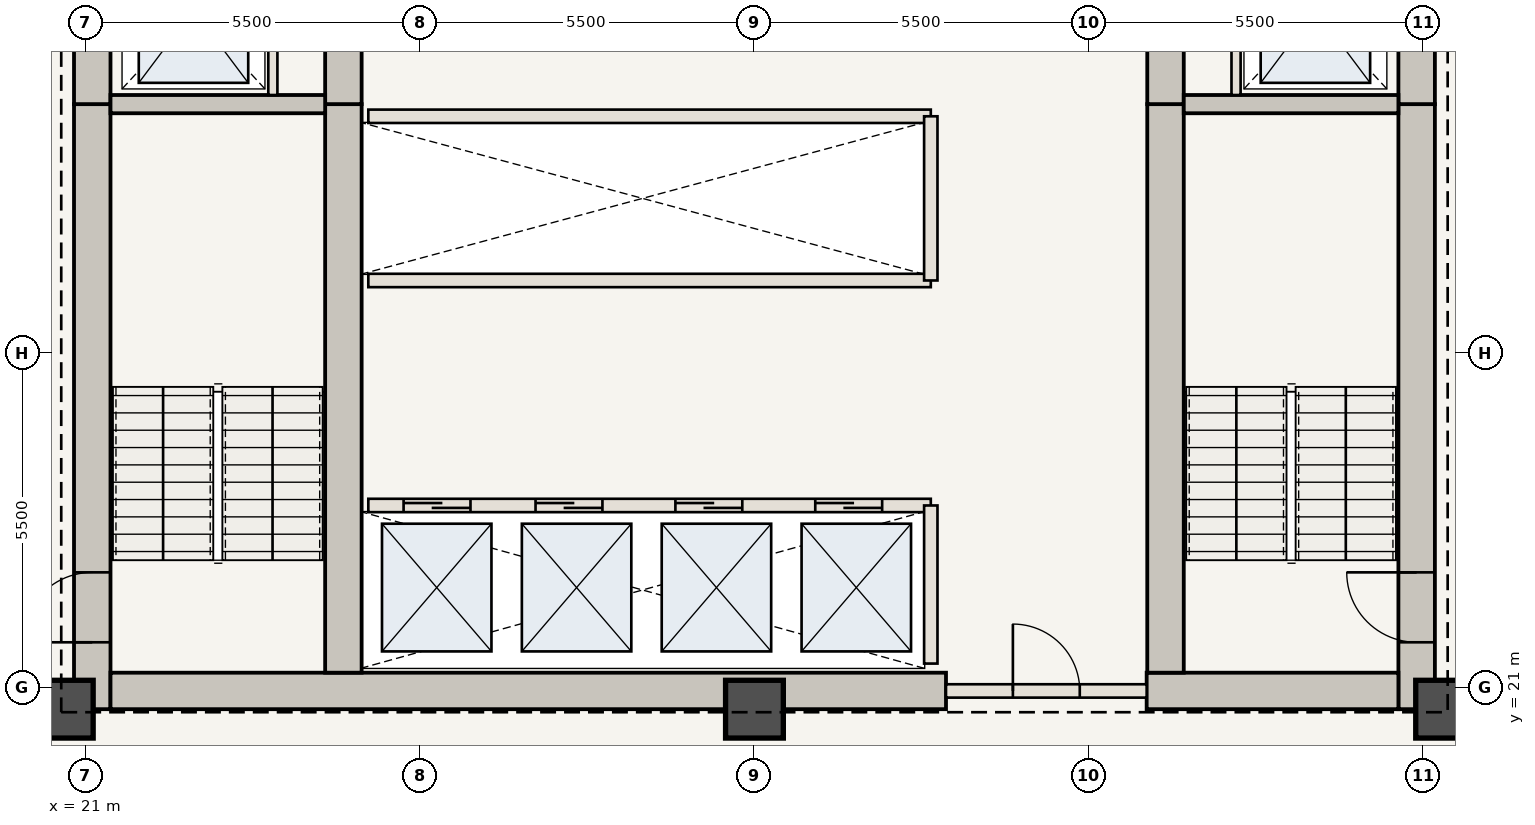
"""IFC4 building model, lengths in metres.
Left out: names, types, materials, properties, quantities, classifications, styles, units other than length and angle.
Written with IfcOpenShell. Run it as: python <this file> out.ifc"""

import sys

from ifc_helpers import new_model, si_unit, direction, frame, frame_2d, origin, origin_2d, place, context, subcontext, project, spatial, rectangle, extrude, element, fill, save


model = new_model("IFC4")
c1 = context("Model", 3, precision=1e-05, world=origin(), true_north=direction((0.0, 1.0)))
c2 = subcontext(c1, "Body", "Model", "MODEL_VIEW")
j1 = project(units=[si_unit("LENGTHUNIT", "METRE"), si_unit("PLANEANGLEUNIT", "RADIAN")], contexts=[c1])
p1 = place(None, origin())
s1 = spatial("IfcSite", under=j1, at=p1, CompositionType="ELEMENT")
p2 = place(p1, origin())
s2 = spatial("IfcBuilding", under=s1, at=p2, CompositionType="ELEMENT")
p3 = place(p2, frame((0.0, 0.0, 152.95)))
s3 = spatial("IfcBuildingStorey", under=s2, at=p3, CompositionType="ELEMENT", Elevation=152.95)
p4 = place(p3, frame((21.11, 20.65, 0.0), z_axis=(0.0, 0.0, 1.0), x_axis=(0.0, 1.0, 0.0)))
e1 = element("IfcWall", 1, at=p4, inside=s3, PredefinedType="SHEAR", context=c2, shape_type="SweptSolid", body=[
    extrude(rectangle(XDim=9.95, YDim=0.6, at=frame_2d((4.975, 0.0))), origin(), (0.0, 0.0, 1.0), 3.85),
])
p5 = place(p4, frame((1.1, 0.0, 0.0)))
e2 = element("IfcOpeningElement", 2, at=p5, cuts=e1, PredefinedType="OPENING", context=c2, shape_type="SweptSolid", body=[
    extrude(rectangle(XDim=1.15, YDim=2.15, at=frame_2d((0.575, 1.075))), frame((0.0, 0.31, 0.0), z_axis=(0.0, -1.0, 0.0), x_axis=(1.0, 0.0, 0.0)), (0.0, 0.0, 1.0), 0.62),
])
p6 = place(p3, frame((21.11, 30.6, 0.0), z_axis=(0.0, 0.0, 1.0), x_axis=(0.0, 1.0, 0.0)))
e3 = element("IfcWall", 3, at=p6, inside=s3, PredefinedType="SHEAR", context=c2, shape_type="SweptSolid", body=[
    extrude(rectangle(XDim=12.7, YDim=0.6, at=frame_2d((6.35, 0.0))), origin(), (0.0, 0.0, 1.0), 3.85),
])
p7 = place(p6, frame((4.2, 0.0, 0.0)))
e4 = element("IfcOpeningElement", 4, at=p7, cuts=e3, PredefinedType="OPENING", context=c2, shape_type="SweptSolid", body=[
    extrude(rectangle(XDim=1.1, YDim=2.15, at=frame_2d((0.55, 1.075))), frame((0.0, 0.31, 0.0), z_axis=(0.0, -1.0, 0.0), x_axis=(1.0, 0.0, 0.0)), (0.0, 0.0, 1.0), 0.62),
])
p8 = place(p6, frame((9.2, 0.0, 0.0)))
e5 = element("IfcOpeningElement", 5, at=p8, cuts=e3, PredefinedType="OPENING", context=c2, shape_type="SweptSolid", body=[
    extrude(rectangle(XDim=0.92, YDim=2.1, at=frame_2d((0.46, 1.05))), frame((0.0, 0.31, 0.0), z_axis=(0.0, -1.0, 0.0), x_axis=(1.0, 0.0, 0.0)), (0.0, 0.0, 1.0), 0.62),
])
p9 = place(p3, frame((42.89, 20.65, 0.0), z_axis=(0.0, 0.0, 1.0), x_axis=(0.0, 1.0, 0.0)))
e6 = element("IfcWall", 6, at=p9, inside=s3, PredefinedType="SHEAR", context=c2, shape_type="SweptSolid", body=[
    extrude(rectangle(XDim=9.95, YDim=0.6, at=frame_2d((4.975, 0.0))), origin(), (0.0, 0.0, 1.0), 3.85),
])
p10 = place(p9, frame((1.1, 0.0, 0.0)))
e7 = element("IfcOpeningElement", 7, at=p10, cuts=e6, PredefinedType="OPENING", context=c2, shape_type="SweptSolid", body=[
    extrude(rectangle(XDim=1.15, YDim=2.15, at=frame_2d((0.575, 1.075))), frame((0.0, 0.31, 0.0), z_axis=(0.0, -1.0, 0.0), x_axis=(1.0, 0.0, 0.0)), (0.0, 0.0, 1.0), 0.62),
])
p11 = place(p3, frame((42.89, 30.6, 0.0), z_axis=(0.0, 0.0, 1.0), x_axis=(0.0, 1.0, 0.0)))
e8 = element("IfcWall", 8, at=p11, inside=s3, PredefinedType="SHEAR", context=c2, shape_type="SweptSolid", body=[
    extrude(rectangle(XDim=12.7, YDim=0.6, at=frame_2d((6.35, 0.0))), origin(), (0.0, 0.0, 1.0), 3.85),
])
p12 = place(p11, frame((4.2, 0.0, 0.0)))
e9 = element("IfcOpeningElement", 9, at=p12, cuts=e8, PredefinedType="OPENING", context=c2, shape_type="SweptSolid", body=[
    extrude(rectangle(XDim=1.1, YDim=2.15, at=frame_2d((0.55, 1.075))), frame((0.0, 0.31, 0.0), z_axis=(0.0, -1.0, 0.0), x_axis=(1.0, 0.0, 0.0)), (0.0, 0.0, 1.0), 0.62),
])
p13 = place(p11, frame((8.05, 0.0, 0.0)))
e10 = element("IfcOpeningElement", 10, at=p13, cuts=e8, PredefinedType="OPENING", context=c2, shape_type="SweptSolid", body=[
    extrude(rectangle(XDim=0.88, YDim=2.1, at=frame_2d((0.44, 1.05))), frame((0.0, 0.31, 0.0), z_axis=(0.0, -1.0, 0.0), x_axis=(1.0, 0.0, 0.0)), (0.0, 0.0, 1.0), 0.62),
])
p14 = place(p11, frame((9.45, 0.0, 0.0)))
e11 = element("IfcOpeningElement", 11, at=p14, cuts=e8, PredefinedType="OPENING", context=c2, shape_type="SweptSolid", body=[
    extrude(rectangle(XDim=0.88, YDim=2.1, at=frame_2d((0.44, 1.05))), frame((0.0, 0.31, 0.0), z_axis=(0.0, -1.0, 0.0), x_axis=(1.0, 0.0, 0.0)), (0.0, 0.0, 1.0), 0.62),
])
p15 = place(p11, frame((10.85, 0.0, 0.0)))
e12 = element("IfcOpeningElement", 12, at=p15, cuts=e8, PredefinedType="OPENING", context=c2, shape_type="SweptSolid", body=[
    extrude(rectangle(XDim=0.88, YDim=2.1, at=frame_2d((0.44, 1.05))), frame((0.0, 0.31, 0.0), z_axis=(0.0, -1.0, 0.0), x_axis=(1.0, 0.0, 0.0)), (0.0, 0.0, 1.0), 0.62),
])
p16 = place(p3, frame((21.41, 20.95, 0.0), z_axis=(0.0, 0.0, 1.0), x_axis=(1.0, 0.0, 0.0)))
e13 = element("IfcWall", 13, at=p16, inside=s3, PredefinedType="SHEAR", context=c2, shape_type="SweptSolid", body=[
    extrude(rectangle(XDim=13.74, YDim=0.6, at=frame_2d((6.87, 0.0))), origin(), (0.0, 0.0, 1.0), 3.85),
])
p17 = place(p3, frame((38.45, 20.95, 0.0), z_axis=(0.0, 0.0, 1.0), x_axis=(1.0, 0.0, 0.0)))
e14 = element("IfcWall", 14, at=p17, inside=s3, PredefinedType="SHEAR", context=c2, shape_type="SweptSolid", body=[
    extrude(rectangle(XDim=4.14, YDim=0.6, at=frame_2d((2.07, 0.0))), origin(), (0.0, 0.0, 1.0), 3.85),
])
p18 = place(p3, frame((25.24, 21.25, 0.0), z_axis=(0.0, 0.0, 1.0), x_axis=(0.0, 1.0, 0.0)))
e15 = element("IfcWall", 15, at=p18, inside=s3, PredefinedType="SHEAR", context=c2, shape_type="SweptSolid", body=[
    extrude(rectangle(XDim=9.35, YDim=0.6, at=frame_2d((4.675, 0.0))), origin(), (0.0, 0.0, 1.0), 3.85),
])
p19 = place(p3, frame((25.24, 30.6, 0.0), z_axis=(0.0, 0.0, 1.0), x_axis=(0.0, 1.0, 0.0)))
e16 = element("IfcWall", 16, at=p19, inside=s3, PredefinedType="SHEAR", context=c2, shape_type="SweptSolid", body=[
    extrude(rectangle(XDim=12.1, YDim=0.6, at=frame_2d((6.05, 0.0))), origin(), (0.0, 0.0, 1.0), 3.85),
])
p20 = place(p19, frame((6.25, 0.0, 0.0)))
e17 = element("IfcOpeningElement", 17, at=p20, cuts=e16, PredefinedType="OPENING", context=c2, shape_type="SweptSolid", body=[
    extrude(rectangle(XDim=1.1, YDim=2.15, at=frame_2d((0.55, 1.075))), frame((0.0, 0.31, 0.0), z_axis=(0.0, -1.0, 0.0), x_axis=(1.0, 0.0, 0.0)), (0.0, 0.0, 1.0), 0.62),
])
p21 = place(p3, frame((38.76, 21.25, 0.0), z_axis=(0.0, 0.0, 1.0), x_axis=(0.0, 1.0, 0.0)))
e18 = element("IfcWall", 18, at=p21, inside=s3, PredefinedType="SHEAR", context=c2, shape_type="SweptSolid", body=[
    extrude(rectangle(XDim=9.35, YDim=0.6, at=frame_2d((4.675, 0.0))), origin(), (0.0, 0.0, 1.0), 3.85),
])
p22 = place(p3, frame((38.76, 30.6, 0.0), z_axis=(0.0, 0.0, 1.0), x_axis=(0.0, 1.0, 0.0)))
e19 = element("IfcWall", 19, at=p22, inside=s3, PredefinedType="SHEAR", context=c2, shape_type="SweptSolid", body=[
    extrude(rectangle(XDim=12.1, YDim=0.6, at=frame_2d((6.05, 0.0))), origin(), (0.0, 0.0, 1.0), 3.85),
])
for number, where, z_axis, x_axis in (
    (20, (20.65, 20.65, 0.0), (0.0, 0.0, 1.0), (1.0, 0.0, 0.0)),
    (21, (32.0, 20.65, 0.0), (0.0, 0.0, 1.0), (1.0, 0.0, 0.0)),
    (22, (43.35, 20.65, 0.0), (0.0, 0.0, 1.0), (1.0, 0.0, 0.0)),
):
    element("IfcColumn", number, at=place(p3, frame(where, z_axis=z_axis, x_axis=x_axis)), inside=s3, PredefinedType="COLUMN", context=c2, shape_type="SweptSolid", body=[
        extrude(rectangle(XDim=0.95, YDim=0.95, at=origin_2d()), origin(), (0.0, 0.0, 1.0), 3.85),
    ])
for number, where, z_axis, x_axis in (
    (23, (21.41, 30.6, 0.0), (0.0, 0.0, 1.0), (1.0, 0.0, 0.0)),
    (24, (39.06, 30.6, 0.0), (0.0, 0.0, 1.0), (1.0, 0.0, 0.0)),
):
    element("IfcWall", number, at=place(p3, frame(where, z_axis=z_axis, x_axis=x_axis)), inside=s3, PredefinedType="SHEAR", context=c2, shape_type="SweptSolid", body=[
        extrude(rectangle(XDim=3.53, YDim=0.3, at=frame_2d((1.765, 0.0))), origin(), (0.0, 0.0, 1.0), 3.685),
    ])
for number, where, z_axis, x_axis in (
    (25, (24.08, 30.75, 0.0), (0.0, 0.0, 1.0), (0.0, 1.0, 0.0)),
    (26, (39.92, 30.75, 0.0), (0.0, 0.0, 1.0), (0.0, 1.0, 0.0)),
):
    element("IfcWall", number, at=place(p3, frame(where, z_axis=z_axis, x_axis=x_axis)), inside=s3, PredefinedType="STANDARD", context=c2, shape_type="SweptSolid", body=[
        extrude(rectangle(XDim=2.65, YDim=0.15, at=frame_2d((1.325, 0.0))), origin(), (0.0, 0.0, 1.0), 3.685),
    ])
p23 = place(p3, frame((35.15, 20.95, 0.0), z_axis=(0.0, 0.0, 1.0), x_axis=(1.0, 0.0, 0.0)))
e27 = element("IfcWall", 27, at=p23, inside=s3, PredefinedType="STANDARD", context=c2, shape_type="SweptSolid", body=[
    extrude(rectangle(XDim=3.3, YDim=0.22, at=frame_2d((1.65, 0.0))), origin(), (0.0, 0.0, 1.0), 3.685),
])
p24 = place(p23, frame((1.1, 0.0, 0.0)))
e28 = element("IfcOpeningElement", 28, at=p24, cuts=e27, PredefinedType="OPENING", context=c2, shape_type="SweptSolid", body=[
    extrude(rectangle(XDim=1.1, YDim=2.15, at=frame_2d((0.55, 1.075))), frame((0.0, 0.12, 0.0), z_axis=(0.0, -1.0, 0.0), x_axis=(1.0, 0.0, 0.0)), (0.0, 0.0, 1.0), 0.24),
])
p25 = place(p3, frame((25.65, 24.0, 0.0), z_axis=(0.0, 0.0, 1.0), x_axis=(1.0, 0.0, 0.0)))
e29 = element("IfcWall", 29, at=p25, inside=s3, PredefinedType="STANDARD", context=c2, shape_type="SweptSolid", body=[
    extrude(rectangle(XDim=9.25, YDim=0.22, at=frame_2d((4.625, 0.0))), origin(), (0.0, 0.0, 1.0), 3.685),
])
p26 = place(p25, frame((0.58, 0.0, 0.0)))
e30 = element("IfcOpeningElement", 30, at=p26, cuts=e29, PredefinedType="OPENING", context=c2, shape_type="SweptSolid", body=[
    extrude(rectangle(XDim=1.1, YDim=2.15, at=frame_2d((0.55, 1.075))), frame((0.0, 0.12, 0.0), z_axis=(0.0, -1.0, 0.0), x_axis=(1.0, 0.0, 0.0)), (0.0, 0.0, 1.0), 0.24),
])
p27 = place(p25, frame((2.75, 0.0, 0.0)))
e31 = element("IfcOpeningElement", 31, at=p27, cuts=e29, PredefinedType="OPENING", context=c2, shape_type="SweptSolid", body=[
    extrude(rectangle(XDim=1.1, YDim=2.15, at=frame_2d((0.55, 1.075))), frame((0.0, 0.12, 0.0), z_axis=(0.0, -1.0, 0.0), x_axis=(1.0, 0.0, 0.0)), (0.0, 0.0, 1.0), 0.24),
])
p28 = place(p25, frame((5.05, 0.0, 0.0)))
e32 = element("IfcOpeningElement", 32, at=p28, cuts=e29, PredefinedType="OPENING", context=c2, shape_type="SweptSolid", body=[
    extrude(rectangle(XDim=1.1, YDim=2.15, at=frame_2d((0.55, 1.075))), frame((0.0, 0.12, 0.0), z_axis=(0.0, -1.0, 0.0), x_axis=(1.0, 0.0, 0.0)), (0.0, 0.0, 1.0), 0.24),
])
p29 = place(p25, frame((7.35, 0.0, 0.0)))
e33 = element("IfcOpeningElement", 33, at=p29, cuts=e29, PredefinedType="OPENING", context=c2, shape_type="SweptSolid", body=[
    extrude(rectangle(XDim=1.1, YDim=2.15, at=frame_2d((0.55, 1.075))), frame((0.0, 0.12, 0.0), z_axis=(0.0, -1.0, 0.0), x_axis=(1.0, 0.0, 0.0)), (0.0, 0.0, 1.0), 0.24),
])
p30 = place(p3, frame((34.9, 21.4, 0.0), z_axis=(0.0, 0.0, 1.0), x_axis=(0.0, 1.0, 0.0)))
e34 = element("IfcWall", 34, at=p30, inside=s3, PredefinedType="STANDARD", context=c2, shape_type="SweptSolid", body=[
    extrude(rectangle(XDim=2.6, YDim=0.22, at=frame_2d((1.3, 0.0))), origin(), (0.0, 0.0, 1.0), 3.685),
])
for number, where, z_axis, x_axis in (
    (35, (25.65, 27.7, 0.0), (0.0, 0.0, 1.0), (1.0, 0.0, 0.0)),
    (36, (25.65, 30.4, 0.0), (0.0, 0.0, 1.0), (1.0, 0.0, 0.0)),
):
    element("IfcWall", number, at=place(p3, frame(where, z_axis=z_axis, x_axis=x_axis)), inside=s3, PredefinedType="STANDARD", context=c2, shape_type="SweptSolid", body=[
        extrude(rectangle(XDim=9.25, YDim=0.22, at=frame_2d((4.625, 0.0))), origin(), (0.0, 0.0, 1.0), 3.685),
    ])
p31 = place(p3, frame((34.9, 27.7, 0.0), z_axis=(0.0, 0.0, 1.0), x_axis=(0.0, 1.0, 0.0)))
e37 = element("IfcWall", 37, at=p31, inside=s3, PredefinedType="STANDARD", context=c2, shape_type="SweptSolid", body=[
    extrude(rectangle(XDim=2.7, YDim=0.22, at=frame_2d((1.35, 0.0))), origin(), (0.0, 0.0, 1.0), 3.685),
])
p32 = place(p5, origin())
e38 = element("IfcDoor", 38, at=p32, inside=s3, OperationType="SINGLE_SWING_LEFT", PredefinedType="DOOR", context=c2, shape_type="SweptSolid", body=[
    extrude(rectangle(XDim=1.15, YDim=2.15, at=frame_2d((0.575, 1.075))), frame((0.0, 0.025, 0.0), z_axis=(0.0, -1.0, 0.0), x_axis=(1.0, 0.0, 0.0)), (0.0, 0.0, 1.0), 0.05),
])
fill(e2, e38)
p33 = place(p10, origin())
e39 = element("IfcDoor", 39, at=p33, inside=s3, OperationType="SINGLE_SWING_RIGHT", PredefinedType="DOOR", context=c2, shape_type="SweptSolid", body=[
    extrude(rectangle(XDim=1.15, YDim=2.15, at=frame_2d((0.575, 1.075))), frame((0.0, 0.025, 0.0), z_axis=(0.0, -1.0, 0.0), x_axis=(1.0, 0.0, 0.0)), (0.0, 0.0, 1.0), 0.05),
])
fill(e7, e39)
p34 = place(p24, origin())
e40 = element("IfcDoor", 40, at=p34, inside=s3, OperationType="SINGLE_SWING_LEFT", PredefinedType="DOOR", context=c2, shape_type="SweptSolid", body=[
    extrude(rectangle(XDim=1.1, YDim=2.15, at=frame_2d((0.55, 1.075))), frame((0.0, 0.025, 0.0), z_axis=(0.0, -1.0, 0.0), x_axis=(1.0, 0.0, 0.0)), (0.0, 0.0, 1.0), 0.05),
])
fill(e28, e40)
p35 = place(p26, origin())
e41 = element("IfcDoor", 41, at=p35, inside=s3, OperationType="DOUBLE_DOOR_SLIDING", PredefinedType="DOOR", context=c2, shape_type="SweptSolid", body=[
    extrude(rectangle(XDim=1.1, YDim=2.15, at=frame_2d((0.55, 1.075))), frame((0.0, 0.025, 0.0), z_axis=(0.0, -1.0, 0.0), x_axis=(1.0, 0.0, 0.0)), (0.0, 0.0, 1.0), 0.05),
])
fill(e30, e41)
p36 = place(p27, origin())
e42 = element("IfcDoor", 42, at=p36, inside=s3, OperationType="DOUBLE_DOOR_SLIDING", PredefinedType="DOOR", context=c2, shape_type="SweptSolid", body=[
    extrude(rectangle(XDim=1.1, YDim=2.15, at=frame_2d((0.55, 1.075))), frame((0.0, 0.025, 0.0), z_axis=(0.0, -1.0, 0.0), x_axis=(1.0, 0.0, 0.0)), (0.0, 0.0, 1.0), 0.05),
])
fill(e31, e42)
p37 = place(p28, origin())
e43 = element("IfcDoor", 43, at=p37, inside=s3, OperationType="DOUBLE_DOOR_SLIDING", PredefinedType="DOOR", context=c2, shape_type="SweptSolid", body=[
    extrude(rectangle(XDim=1.1, YDim=2.15, at=frame_2d((0.55, 1.075))), frame((0.0, 0.025, 0.0), z_axis=(0.0, -1.0, 0.0), x_axis=(1.0, 0.0, 0.0)), (0.0, 0.0, 1.0), 0.05),
])
fill(e32, e43)
p38 = place(p29, origin())
e44 = element("IfcDoor", 44, at=p38, inside=s3, OperationType="DOUBLE_DOOR_SLIDING", PredefinedType="DOOR", context=c2, shape_type="SweptSolid", body=[
    extrude(rectangle(XDim=1.1, YDim=2.15, at=frame_2d((0.55, 1.075))), frame((0.0, 0.025, 0.0), z_axis=(0.0, -1.0, 0.0), x_axis=(1.0, 0.0, 0.0)), (0.0, 0.0, 1.0), 0.05),
])
fill(e33, e44)
save(model, sys.argv[1])
